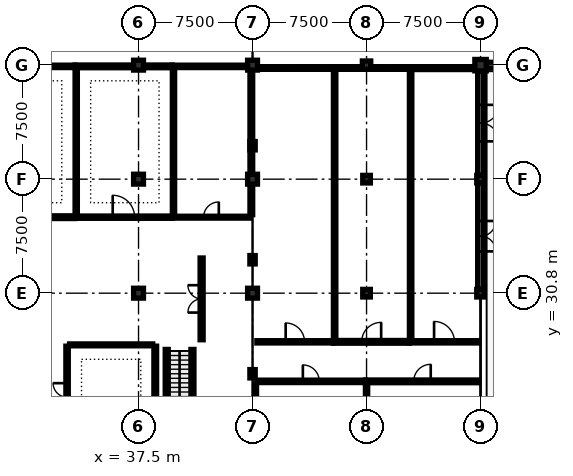
"""IFC4 building model, lengths in metres.
Left out: names, types, materials, properties, quantities, classifications, styles, units other than length and angle.
Written with IfcOpenShell. Run it as: python <this file> out.ifc"""

import sys

from ifc_helpers import new_model, si_unit, direction, frame, frame_2d, origin, origin_2d, place, context, subcontext, project, spatial, rectangle, circle, extrude, element, fill, save


model = new_model("IFC4")
c1 = context("Model", 3, precision=1e-05, world=origin(), true_north=direction((0.0, 1.0)))
c2 = subcontext(c1, "Body", "Model", "MODEL_VIEW")
j1 = project(units=[si_unit("LENGTHUNIT", "METRE"), si_unit("PLANEANGLEUNIT", "RADIAN")], contexts=[c1])
p1 = place(None, origin())
s1 = spatial("IfcSite", under=j1, at=p1, CompositionType="ELEMENT")
p2 = place(p1, origin())
s2 = spatial("IfcBuilding", under=s1, at=p2, CompositionType="ELEMENT")
p3 = place(p2, origin())
s3 = spatial("IfcBuildingStorey", under=s2, at=p3, CompositionType="ELEMENT", Elevation=0.0)
for number, where, z_axis, x_axis in (
    (1, (37.5, 30.8, 0.0), (0.0, 0.0, 1.0), (1.0, 0.0, 0.0)),
    (2, (37.5, 38.3, 0.0), (0.0, 0.0, 1.0), (1.0, 0.0, 0.0)),
    (3, (37.5, 45.8, 0.0), (0.0, 0.0, 1.0), (1.0, 0.0, 0.0)),
    (4, (45.0, 30.8, 0.0), (0.0, 0.0, 1.0), (1.0, 0.0, 0.0)),
    (5, (45.0, 38.3, 0.0), (0.0, 0.0, 1.0), (1.0, 0.0, 0.0)),
    (6, (45.0, 45.8, 0.0), (0.0, 0.0, 1.0), (1.0, 0.0, 0.0)),
):
    element("IfcColumn", number, at=place(p3, frame(where, z_axis=z_axis, x_axis=x_axis)), inside=s3, PredefinedType="COLUMN", context=c2, shape_type="SweptSolid", body=[
        extrude(rectangle(XDim=0.65, YDim=0.65, at=origin_2d()), origin(), (0.0, 0.0, 1.0), 4.7),
    ])
for number, where, z_axis, x_axis in (
    (7, (52.5, 30.8, 0.0), (0.0, 0.0, 1.0), (1.0, 0.0, 0.0)),
    (8, (52.5, 38.3, 0.0), (0.0, 0.0, 1.0), (1.0, 0.0, 0.0)),
):
    element("IfcColumn", number, at=place(p3, frame(where, z_axis=z_axis, x_axis=x_axis)), inside=s3, PredefinedType="COLUMN", context=c2, shape_type="SweptSolid", body=[
        extrude(rectangle(XDim=0.5, YDim=0.5, at=origin_2d()), origin(), (0.0, 0.0, 1.0), 5.036),
    ])
p4 = place(p3, frame((52.5, 45.8, 0.0), z_axis=(0.0, 0.0, 1.0), x_axis=(1.0, 0.0, 0.0)))
e9 = element("IfcColumn", 9, at=p4, inside=s3, PredefinedType="COLUMN", context=c2, shape_type="SweptSolid", body=[
    extrude(rectangle(XDim=0.55, YDim=0.55, at=origin_2d()), origin(), (0.0, 0.0, 1.0), 4.7),
])
for number, where, z_axis, x_axis in (
    (10, (60.0, 30.8, 0.0), (0.0, 0.0, 1.0), (1.0, 0.0, 0.0)),
    (11, (60.0, 38.3, 0.0), (0.0, 0.0, 1.0), (1.0, 0.0, 0.0)),
):
    element("IfcColumn", number, at=place(p3, frame(where, z_axis=z_axis, x_axis=x_axis)), inside=s3, PredefinedType="COLUMN", context=c2, shape_type="SweptSolid", body=[
        extrude(rectangle(XDim=0.5, YDim=0.5, at=origin_2d()), origin(), (0.0, 0.0, 1.0), 6.138),
    ])
p5 = place(p3, frame((60.0, 45.8, 0.0), z_axis=(0.0, 0.0, 1.0), x_axis=(1.0, 0.0, 0.0)))
e12 = element("IfcColumn", 12, at=p5, inside=s3, PredefinedType="COLUMN", context=c2, shape_type="SweptSolid", body=[
    extrude(circle(Radius=0.375, at=origin_2d()), origin(), (0.0, 0.0, 1.0), 4.7),
])
for number, where, z_axis, x_axis in (
    (13, (45.0, 25.5, 0.0), (0.0, 0.0, 1.0), (1.0, 0.0, 0.0)),
    (14, (45.0, 33.0, 0.0), (0.0, 0.0, 1.0), (1.0, 0.0, 0.0)),
    (15, (45.0, 40.5, 0.0), (0.0, 0.0, 1.0), (1.0, 0.0, 0.0)),
):
    element("IfcColumn", number, at=place(p3, frame(where, z_axis=z_axis, x_axis=x_axis)), inside=s3, PredefinedType="PILASTER", context=c2, shape_type="SweptSolid", body=[
        extrude(rectangle(XDim=0.35, YDim=0.55, at=origin_2d()), origin(), (0.0, 0.0, 1.0), 4.7),
    ])
p6 = place(p3, frame((62.238, 45.8, 0.0), z_axis=(0.0, 0.0, 1.0), x_axis=(-1.0, 0.0, 0.0)))
e16 = element("IfcWall", 16, at=p6, inside=s3, PredefinedType="SOLIDWALL", context=c2, shape_type="SweptSolid", body=[
    extrude(rectangle(XDim=1.863, YDim=0.38, at=frame_2d((0.932, 0.0))), origin(), (0.0, 0.0, 1.0), 4.035),
])
p7 = place(p3, frame((60.0, 45.425, 0.0), z_axis=(0.0, 0.0, 1.0), x_axis=(0.0, -1.0, 0.0)))
e17 = element("IfcWall", 17, at=p7, inside=s3, PredefinedType="SOLIDWALL", context=c2, shape_type="SweptSolid", body=[
    extrude(rectangle(XDim=6.875, YDim=0.38, at=frame_2d((3.438, 0.0))), origin(), (0.0, 0.0, 1.0), 3.985),
])
p8 = place(p7, frame((2.238, 0.0, 0.0)))
e18 = element("IfcOpeningElement", 18, at=p8, cuts=e17, PredefinedType="OPENING", context=c2, shape_type="SweptSolid", body=[
    extrude(rectangle(XDim=2.4, YDim=2.55, at=frame_2d((1.2, 1.275))), frame((0.0, 0.202, 0.0), z_axis=(0.0, -1.0, 0.0), x_axis=(1.0, 0.0, 0.0)), (0.0, 0.0, 1.0), 0.404),
])
p9 = place(p3, frame((60.0, 38.05, 0.0), z_axis=(0.0, 0.0, 1.0), x_axis=(0.0, -1.0, 0.0)))
e19 = element("IfcWall", 19, at=p9, inside=s3, PredefinedType="SOLIDWALL", context=c2, shape_type="SweptSolid", body=[
    extrude(rectangle(XDim=7.0, YDim=0.38, at=frame_2d((3.5, 0.0))), origin(), (0.0, 0.0, 1.0), 4.7),
])
p10 = place(p9, frame((2.5, 0.0, 0.0)))
e20 = element("IfcOpeningElement", 20, at=p10, cuts=e19, PredefinedType="OPENING", context=c2, shape_type="SweptSolid", body=[
    extrude(rectangle(XDim=2.0, YDim=2.35, at=frame_2d((1.0, 1.175))), frame((0.0, 0.202, 0.0), z_axis=(0.0, -1.0, 0.0), x_axis=(1.0, 0.0, 0.0)), (0.0, 0.0, 1.0), 0.404),
])
for number, where, z_axis, x_axis in (
    (21, (39.355, 16.9, 0.0), (0.0, 0.0, 1.0), (0.0, 1.0, 0.0)),
    (22, (41.045, 16.9, 0.0), (0.0, 0.0, 1.0), (0.0, 1.0, 0.0)),
):
    element("IfcWall", number, at=place(p3, frame(where, z_axis=z_axis, x_axis=x_axis)), inside=s3, PredefinedType="PARTITIONING", context=c2, shape_type="SweptSolid", body=[
        extrude(rectangle(XDim=10.2, YDim=0.2, at=frame_2d((5.1, 0.0))), origin(), (0.0, 0.0, 1.0), 2.3),
    ])
p11 = place(p3, frame((22.727, 35.8, 0.0), z_axis=(0.0, 0.0, 1.0), x_axis=(1.0, 0.0, 0.0)))
e23 = element("IfcWall", 23, at=p11, inside=s3, PredefinedType="PARTITIONING", context=c2, shape_type="SweptSolid", body=[
    extrude(rectangle(XDim=10.588, YDim=0.18, at=frame_2d((5.294, 0.0))), origin(), (0.0, 0.0, 1.0), 3.765),
])
p12 = place(p11, frame((4.604, 0.0, 0.0)))
e24 = element("IfcOpeningElement", 24, at=p12, cuts=e23, PredefinedType="OPENING", context=c2, shape_type="SweptSolid", body=[
    extrude(rectangle(XDim=1.38, YDim=2.3, at=frame_2d((0.69, 1.15))), frame((0.0, 0.102, 0.0), z_axis=(0.0, -1.0, 0.0), x_axis=(1.0, 0.0, 0.0)), (0.0, 0.0, 1.0), 0.204),
])
p13 = place(p3, frame((33.327, 35.8, 0.0), z_axis=(0.0, 0.0, 1.0), x_axis=(1.0, 0.0, 0.0)))
e25 = element("IfcWall", 25, at=p13, inside=s3, PredefinedType="PARTITIONING", context=c2, shape_type="SweptSolid", body=[
    extrude(rectangle(XDim=6.388, YDim=0.15, at=frame_2d((3.194, 0.0))), origin(), (0.0, 0.0, 1.0), 3.985),
])
p14 = place(p13, frame((2.474, 0.0, 0.0)))
e26 = element("IfcOpeningElement", 26, at=p14, cuts=e25, PredefinedType="OPENING", context=c2, shape_type="SweptSolid", body=[
    extrude(rectangle(XDim=1.44, YDim=2.32, at=frame_2d((0.72, 1.16))), frame((0.0, 0.087, 0.0), z_axis=(0.0, -1.0, 0.0), x_axis=(1.0, 0.0, 0.0)), (0.0, 0.0, 1.0), 0.174),
])
p15 = place(p3, frame((39.727, 35.8, 0.0), z_axis=(0.0, 0.0, 1.0), x_axis=(1.0, 0.0, 0.0)))
e27 = element("IfcWall", 27, at=p15, inside=s3, PredefinedType="PARTITIONING", context=c2, shape_type="SweptSolid", body=[
    extrude(rectangle(XDim=5.108, YDim=0.125, at=frame_2d((2.554, 0.0))), origin(), (0.0, 0.0, 1.0), 4.035),
])
p16 = place(p15, frame((2.054, 0.0, 0.0)))
e28 = element("IfcOpeningElement", 28, at=p16, cuts=e27, PredefinedType="OPENING", context=c2, shape_type="SweptSolid", body=[
    extrude(rectangle(XDim=1.0, YDim=2.15, at=frame_2d((0.5, 1.075))), frame((0.0, 0.074, 0.0), z_axis=(0.0, -1.0, 0.0), x_axis=(1.0, 0.0, 0.0)), (0.0, 0.0, 1.0), 0.149),
])
p17 = place(p3, frame((41.65, 27.735, 0.0), z_axis=(0.0, 0.0, 1.0), x_axis=(0.0, 1.0, 0.0)))
e29 = element("IfcWall", 29, at=p17, inside=s3, PredefinedType="PARTITIONING", context=c2, shape_type="SweptSolid", body=[
    extrude(rectangle(XDim=5.38, YDim=0.2, at=frame_2d((2.69, 0.0))), origin(), (0.0, 0.0, 1.0), 3.985),
])
p18 = place(p17, frame((1.79, 0.0, 0.0)))
e30 = element("IfcOpeningElement", 30, at=p18, cuts=e29, PredefinedType="OPENING", context=c2, shape_type="SweptSolid", body=[
    extrude(rectangle(XDim=1.8, YDim=2.15, at=frame_2d((0.9, 1.075))), frame((0.0, 0.112, 0.0), z_axis=(0.0, -1.0, 0.0), x_axis=(1.0, 0.0, 0.0)), (0.0, 0.0, 1.0), 0.224),
])
p19 = place(p3, frame((32.8, 21.527, 0.0), z_axis=(0.0, 0.0, 1.0), x_axis=(0.0, 1.0, 0.0)))
e31 = element("IfcWall", 31, at=p19, inside=s3, PredefinedType="PARTITIONING", context=c2, shape_type="SweptSolid", body=[
    extrude(rectangle(XDim=5.788, YDim=0.16, at=frame_2d((2.894, 0.0))), origin(), (0.0, 0.0, 1.0), 3.985),
])
p20 = place(p19, frame((2.434, 0.0, 0.0)))
e32 = element("IfcOpeningElement", 32, at=p20, cuts=e31, PredefinedType="OPENING", context=c2, shape_type="SweptSolid", body=[
    extrude(rectangle(XDim=0.92, YDim=2.1, at=frame_2d((0.46, 1.05))), frame((0.0, 0.092, 0.0), z_axis=(0.0, -1.0, 0.0), x_axis=(1.0, 0.0, 0.0)), (0.0, 0.0, 1.0), 0.184),
])
p21 = place(p3, frame((45.285, 25.0, 0.0), z_axis=(0.0, 0.0, 1.0), x_axis=(1.0, 0.0, 0.0)))
e33 = element("IfcWall", 33, at=p21, inside=s3, PredefinedType="PARTITIONING", context=c2, shape_type="SweptSolid", body=[
    extrude(rectangle(XDim=7.13, YDim=0.16, at=frame_2d((3.565, 0.0))), origin(), (0.0, 0.0, 1.0), 4.321),
])
p22 = place(p21, frame((3.025, 0.0, 0.0)))
e34 = element("IfcOpeningElement", 34, at=p22, cuts=e33, PredefinedType="OPENING", context=c2, shape_type="SweptSolid", body=[
    extrude(rectangle(XDim=1.08, YDim=2.18, at=frame_2d((0.54, 1.09))), frame((0.0, 0.092, 0.0), z_axis=(0.0, -1.0, 0.0), x_axis=(1.0, 0.0, 0.0)), (0.0, 0.0, 1.0), 0.184),
])
p23 = place(p3, frame((52.427, 25.0, 0.0), z_axis=(0.0, 0.0, 1.0), x_axis=(1.0, 0.0, 0.0)))
e35 = element("IfcWall", 35, at=p23, inside=s3, PredefinedType="PARTITIONING", context=c2, shape_type="SweptSolid", body=[
    extrude(rectangle(XDim=7.471, YDim=0.18, at=frame_2d((3.735, 0.0))), origin(), (0.0, 0.0, 1.0), 4.321),
])
p24 = place(p23, frame((3.176, 0.0, 0.0)))
e36 = element("IfcOpeningElement", 36, at=p24, cuts=e35, PredefinedType="OPENING", context=c2, shape_type="SweptSolid", body=[
    extrude(rectangle(XDim=1.12, YDim=2.2, at=frame_2d((0.56, 1.1))), frame((0.0, 0.102, 0.0), z_axis=(0.0, -1.0, 0.0), x_axis=(1.0, 0.0, 0.0)), (0.0, 0.0, 1.0), 0.204),
])
p25 = place(p3, frame((45.285, 27.6, 0.0), z_axis=(0.0, 0.0, 1.0), x_axis=(1.0, 0.0, 0.0)))
e37 = element("IfcWall", 37, at=p25, inside=s3, PredefinedType="PARTITIONING", context=c2, shape_type="SweptSolid", body=[
    extrude(rectangle(XDim=5.03, YDim=0.15, at=frame_2d((2.515, 0.0))), origin(), (0.0, 0.0, 1.0), 4.7),
])
p26 = place(p25, frame((1.895, 0.0, 0.0)))
e38 = element("IfcOpeningElement", 38, at=p26, cuts=e37, PredefinedType="OPENING", context=c2, shape_type="SweptSolid", body=[
    extrude(rectangle(XDim=1.24, YDim=2.2, at=frame_2d((0.62, 1.1))), frame((0.0, 0.087, 0.0), z_axis=(0.0, -1.0, 0.0), x_axis=(1.0, 0.0, 0.0)), (0.0, 0.0, 1.0), 0.174),
])
p27 = place(p3, frame((50.327, 27.6, 0.0), z_axis=(0.0, 0.0, 1.0), x_axis=(1.0, 0.0, 0.0)))
e39 = element("IfcWall", 39, at=p27, inside=s3, PredefinedType="PARTITIONING", context=c2, shape_type="SweptSolid", body=[
    extrude(rectangle(XDim=4.988, YDim=0.18, at=frame_2d((2.494, 0.0))), origin(), (0.0, 0.0, 1.0), 4.321),
])
p28 = place(p27, frame((1.854, 0.0, 0.0)))
e40 = element("IfcOpeningElement", 40, at=p28, cuts=e39, PredefinedType="OPENING", context=c2, shape_type="SweptSolid", body=[
    extrude(rectangle(XDim=1.28, YDim=2.22, at=frame_2d((0.64, 1.11))), frame((0.0, 0.102, 0.0), z_axis=(0.0, -1.0, 0.0), x_axis=(1.0, 0.0, 0.0)), (0.0, 0.0, 1.0), 0.204),
])
p29 = place(p3, frame((55.327, 27.6, 0.0), z_axis=(0.0, 0.0, 1.0), x_axis=(1.0, 0.0, 0.0)))
e41 = element("IfcWall", 41, at=p29, inside=s3, PredefinedType="PARTITIONING", context=c2, shape_type="SweptSolid", body=[
    extrude(rectangle(XDim=4.571, YDim=0.15, at=frame_2d((2.286, 0.0))), origin(), (0.0, 0.0, 1.0), 4.7),
])
p30 = place(p29, frame((1.615, 0.0, 0.0)))
e42 = element("IfcOpeningElement", 42, at=p30, cuts=e41, PredefinedType="OPENING", context=c2, shape_type="SweptSolid", body=[
    extrude(rectangle(XDim=1.34, YDim=2.24, at=frame_2d((0.67, 1.12))), frame((0.0, 0.087, 0.0), z_axis=(0.0, -1.0, 0.0), x_axis=(1.0, 0.0, 0.0)), (0.0, 0.0, 1.0), 0.174),
])
p31 = place(p3, frame((23.052, 45.72, 0.0), z_axis=(0.0, 0.0, 1.0), x_axis=(1.0, 0.0, 0.0)))
e43 = element("IfcWall", 43, at=p31, inside=s3, PredefinedType="PARTITIONING", context=c2, shape_type="SweptSolid", body=[
    extrude(rectangle(XDim=10.263, YDim=0.16, at=frame_2d((5.131, 0.0))), origin(), (0.0, 0.0, 1.0), 3.765),
])
p32 = place(p3, frame((33.327, 45.72, 0.0), z_axis=(0.0, 0.0, 1.0), x_axis=(1.0, 0.0, 0.0)))
e44 = element("IfcWall", 44, at=p32, inside=s3, PredefinedType="PARTITIONING", context=c2, shape_type="SweptSolid", body=[
    extrude(rectangle(XDim=6.388, YDim=0.18, at=frame_2d((3.194, 0.0))), origin(), (0.0, 0.0, 1.0), 3.985),
])
p33 = place(p3, frame((39.727, 45.72, 0.0), z_axis=(0.0, 0.0, 1.0), x_axis=(1.0, 0.0, 0.0)))
e45 = element("IfcWall", 45, at=p33, inside=s3, PredefinedType="PARTITIONING", context=c2, shape_type="SweptSolid", body=[
    extrude(rectangle(XDim=4.941, YDim=0.16, at=frame_2d((2.47, 0.0))), origin(), (0.0, 0.0, 1.0), 3.985),
])
p34 = place(p3, frame((38.6, 21.527, 0.0), z_axis=(0.0, 0.0, 1.0), x_axis=(0.0, 1.0, 0.0)))
e46 = element("IfcWall", 46, at=p34, inside=s3, PredefinedType="PARTITIONING", context=c2, shape_type="SweptSolid", body=[
    extrude(rectangle(XDim=5.788, YDim=0.18, at=frame_2d((2.894, 0.0))), origin(), (0.0, 0.0, 1.0), 4.7),
])
p35 = place(p3, frame((45.337, 45.6, 0.0), z_axis=(0.0, 0.0, 1.0), x_axis=(1.0, 0.0, 0.0)))
e47 = element("IfcWall", 47, at=p35, inside=s3, PredefinedType="PARTITIONING", context=c2, shape_type="SweptSolid", body=[
    extrude(rectangle(XDim=4.978, YDim=0.15, at=frame_2d((2.489, 0.0))), origin(), (0.0, 0.0, 1.0), 4.035),
])
p36 = place(p3, frame((50.327, 45.6, 0.0), z_axis=(0.0, 0.0, 1.0), x_axis=(1.0, 0.0, 0.0)))
e48 = element("IfcWall", 48, at=p36, inside=s3, PredefinedType="PARTITIONING", context=c2, shape_type="SweptSolid", body=[
    extrude(rectangle(XDim=4.988, YDim=0.15, at=frame_2d((2.494, 0.0))), origin(), (0.0, 0.0, 1.0), 3.985),
])
p37 = place(p3, frame((55.327, 45.6, 0.0), z_axis=(0.0, 0.0, 1.0), x_axis=(1.0, 0.0, 0.0)))
e49 = element("IfcWall", 49, at=p37, inside=s3, PredefinedType="PARTITIONING", context=c2, shape_type="SweptSolid", body=[
    extrude(rectangle(XDim=4.345, YDim=0.18, at=frame_2d((2.172, 0.0))), origin(), (0.0, 0.0, 1.0), 3.985),
])
p38 = place(p3, frame((33.4, 35.887, 0.0), z_axis=(0.0, 0.0, 1.0), x_axis=(0.0, 1.0, 0.0)))
e50 = element("IfcWall", 50, at=p38, inside=s3, PredefinedType="PARTITIONING", context=c2, shape_type="SweptSolid", body=[
    extrude(rectangle(XDim=9.731, YDim=0.15, at=frame_2d((4.865, 0.0))), origin(), (0.0, 0.0, 1.0), 3.985),
])
p39 = place(p3, frame((39.8, 35.875, 0.0), z_axis=(0.0, 0.0, 1.0), x_axis=(0.0, 1.0, 0.0)))
e51 = element("IfcWall", 51, at=p39, inside=s3, PredefinedType="PARTITIONING", context=c2, shape_type="SweptSolid", body=[
    extrude(rectangle(XDim=9.753, YDim=0.15, at=frame_2d((4.877, 0.0))), origin(), (0.0, 0.0, 1.0), 3.985),
])
p40 = place(p3, frame((44.92, 35.965, 0.0), z_axis=(0.0, 0.0, 1.0), x_axis=(0.0, 1.0, 0.0)))
e52 = element("IfcWall", 52, at=p40, inside=s3, PredefinedType="PARTITIONING", context=c2, shape_type="SweptSolid", body=[
    extrude(rectangle(XDim=9.498, YDim=0.18, at=frame_2d((4.749, 0.0))), origin(), (0.0, 0.0, 1.0), 3.985),
])
p41 = place(p3, frame((32.965, 27.4, 0.0), z_axis=(0.0, 0.0, 1.0), x_axis=(1.0, 0.0, 0.0)))
e53 = element("IfcWall", 53, at=p41, inside=s3, PredefinedType="PARTITIONING", context=c2, shape_type="SweptSolid", body=[
    extrude(rectangle(XDim=5.47, YDim=0.125, at=frame_2d((2.735, 0.0))), origin(), (0.0, 0.0, 1.0), 3.985),
])
p42 = place(p3, frame((45.2, 8.637, 0.0), z_axis=(0.0, 0.0, 1.0), x_axis=(0.0, 1.0, 0.0)))
e54 = element("IfcWall", 54, at=p42, inside=s3, PredefinedType="PARTITIONING", context=c2, shape_type="SweptSolid", body=[
    extrude(rectangle(XDim=16.198, YDim=0.125, at=frame_2d((8.099, 0.0))), origin(), (0.0, 0.0, 1.0), 3.985),
])
p43 = place(p3, frame((52.5, 8.562, 0.0), z_axis=(0.0, 0.0, 1.0), x_axis=(0.0, 1.0, 0.0)))
e55 = element("IfcWall", 55, at=p43, inside=s3, PredefinedType="PARTITIONING", context=c2, shape_type="SweptSolid", body=[
    extrude(rectangle(XDim=16.336, YDim=0.15, at=frame_2d((8.168, 0.0))), origin(), (0.0, 0.0, 1.0), 4.315),
])
for number, where, z_axis, x_axis in (
    (56, (50.4, 27.702, 0.0), (0.0, 0.0, 1.0), (0.0, 1.0, 0.0)),
    (57, (55.4, 27.687, 0.0), (0.0, 0.0, 1.0), (0.0, 1.0, 0.0)),
):
    element("IfcWall", number, at=place(p3, frame(where, z_axis=z_axis, x_axis=x_axis)), inside=s3, PredefinedType="PARTITIONING", context=c2, shape_type="SweptSolid", body=[
        extrude(rectangle(XDim=17.811, YDim=0.16, at=frame_2d((8.906, 0.0))), origin(), (0.0, 0.0, 1.0), 4.035),
    ])
p44 = place(p8, origin())
e58 = element("IfcDoor", 58, at=p44, inside=s3, OperationType="DOUBLE_DOOR_SINGLE_SWING", PredefinedType="DOOR", context=c2, shape_type="SweptSolid", body=[
    extrude(rectangle(XDim=2.4, YDim=2.55, at=frame_2d((1.2, 1.275))), frame((0.0, 0.025, 0.0), z_axis=(0.0, -1.0, 0.0), x_axis=(1.0, 0.0, 0.0)), (0.0, 0.0, 1.0), 0.05),
])
fill(e18, e58)
p45 = place(p10, origin())
e59 = element("IfcDoor", 59, at=p45, inside=s3, OperationType="DOUBLE_DOOR_SINGLE_SWING", PredefinedType="DOOR", context=c2, shape_type="SweptSolid", body=[
    extrude(rectangle(XDim=2.0, YDim=2.35, at=frame_2d((1.0, 1.175))), frame((0.0, 0.025, 0.0), z_axis=(0.0, -1.0, 0.0), x_axis=(1.0, 0.0, 0.0)), (0.0, 0.0, 1.0), 0.05),
])
fill(e20, e59)
p46 = place(p14, origin())
e60 = element("IfcDoor", 60, at=p46, inside=s3, OperationType="SINGLE_SWING_LEFT", PredefinedType="DOOR", context=c2, shape_type="SweptSolid", body=[
    extrude(rectangle(XDim=1.44, YDim=2.32, at=frame_2d((0.72, 1.16))), frame((0.0, 0.025, 0.0), z_axis=(0.0, -1.0, 0.0), x_axis=(1.0, 0.0, 0.0)), (0.0, 0.0, 1.0), 0.05),
])
fill(e26, e60)
p47 = place(p16, origin())
e61 = element("IfcDoor", 61, at=p47, inside=s3, OperationType="SINGLE_SWING_RIGHT", PredefinedType="DOOR", context=c2, shape_type="SweptSolid", body=[
    extrude(rectangle(XDim=1.0, YDim=2.15, at=frame_2d((0.5, 1.075))), frame((0.0, 0.025, 0.0), z_axis=(0.0, -1.0, 0.0), x_axis=(1.0, 0.0, 0.0)), (0.0, 0.0, 1.0), 0.05),
])
fill(e28, e61)
p48 = place(p18, origin())
e62 = element("IfcDoor", 62, at=p48, inside=s3, OperationType="DOUBLE_DOOR_SINGLE_SWING", PredefinedType="DOOR", context=c2, shape_type="SweptSolid", body=[
    extrude(rectangle(XDim=1.8, YDim=2.15, at=frame_2d((0.9, 1.075))), frame((0.0, 0.025, 0.0), z_axis=(0.0, -1.0, 0.0), x_axis=(1.0, 0.0, 0.0)), (0.0, 0.0, 1.0), 0.05),
])
fill(e30, e62)
p49 = place(p20, origin())
e63 = element("IfcDoor", 63, at=p49, inside=s3, OperationType="SINGLE_SWING_RIGHT", PredefinedType="DOOR", context=c2, shape_type="SweptSolid", body=[
    extrude(rectangle(XDim=0.92, YDim=2.1, at=frame_2d((0.46, 1.05))), frame((0.0, 0.025, 0.0), z_axis=(0.0, -1.0, 0.0), x_axis=(1.0, 0.0, 0.0)), (0.0, 0.0, 1.0), 0.05),
])
fill(e32, e63)
p50 = place(p22, origin())
e64 = element("IfcDoor", 64, at=p50, inside=s3, OperationType="SINGLE_SWING_LEFT", PredefinedType="DOOR", context=c2, shape_type="SweptSolid", body=[
    extrude(rectangle(XDim=1.08, YDim=2.18, at=frame_2d((0.54, 1.09))), frame((0.0, 0.025, 0.0), z_axis=(0.0, -1.0, 0.0), x_axis=(1.0, 0.0, 0.0)), (0.0, 0.0, 1.0), 0.05),
])
fill(e34, e64)
p51 = place(p24, origin())
e65 = element("IfcDoor", 65, at=p51, inside=s3, OperationType="SINGLE_SWING_RIGHT", PredefinedType="DOOR", context=c2, shape_type="SweptSolid", body=[
    extrude(rectangle(XDim=1.12, YDim=2.2, at=frame_2d((0.56, 1.1))), frame((0.0, 0.025, 0.0), z_axis=(0.0, -1.0, 0.0), x_axis=(1.0, 0.0, 0.0)), (0.0, 0.0, 1.0), 0.05),
])
fill(e36, e65)
p52 = place(p26, origin())
e66 = element("IfcDoor", 66, at=p52, inside=s3, OperationType="SINGLE_SWING_LEFT", PredefinedType="DOOR", context=c2, shape_type="SweptSolid", body=[
    extrude(rectangle(XDim=1.24, YDim=2.2, at=frame_2d((0.62, 1.1))), frame((0.0, 0.025, 0.0), z_axis=(0.0, -1.0, 0.0), x_axis=(1.0, 0.0, 0.0)), (0.0, 0.0, 1.0), 0.05),
])
fill(e38, e66)
p53 = place(p28, origin())
e67 = element("IfcDoor", 67, at=p53, inside=s3, OperationType="SINGLE_SWING_RIGHT", PredefinedType="DOOR", context=c2, shape_type="SweptSolid", body=[
    extrude(rectangle(XDim=1.28, YDim=2.22, at=frame_2d((0.64, 1.11))), frame((0.0, 0.025, 0.0), z_axis=(0.0, -1.0, 0.0), x_axis=(1.0, 0.0, 0.0)), (0.0, 0.0, 1.0), 0.05),
])
fill(e40, e67)
p54 = place(p30, origin())
e68 = element("IfcDoor", 68, at=p54, inside=s3, OperationType="SINGLE_SWING_LEFT", PredefinedType="DOOR", context=c2, shape_type="SweptSolid", body=[
    extrude(rectangle(XDim=1.34, YDim=2.24, at=frame_2d((0.67, 1.12))), frame((0.0, 0.025, 0.0), z_axis=(0.0, -1.0, 0.0), x_axis=(1.0, 0.0, 0.0)), (0.0, 0.0, 1.0), 0.05),
])
fill(e42, e68)
save(model, sys.argv[1])
